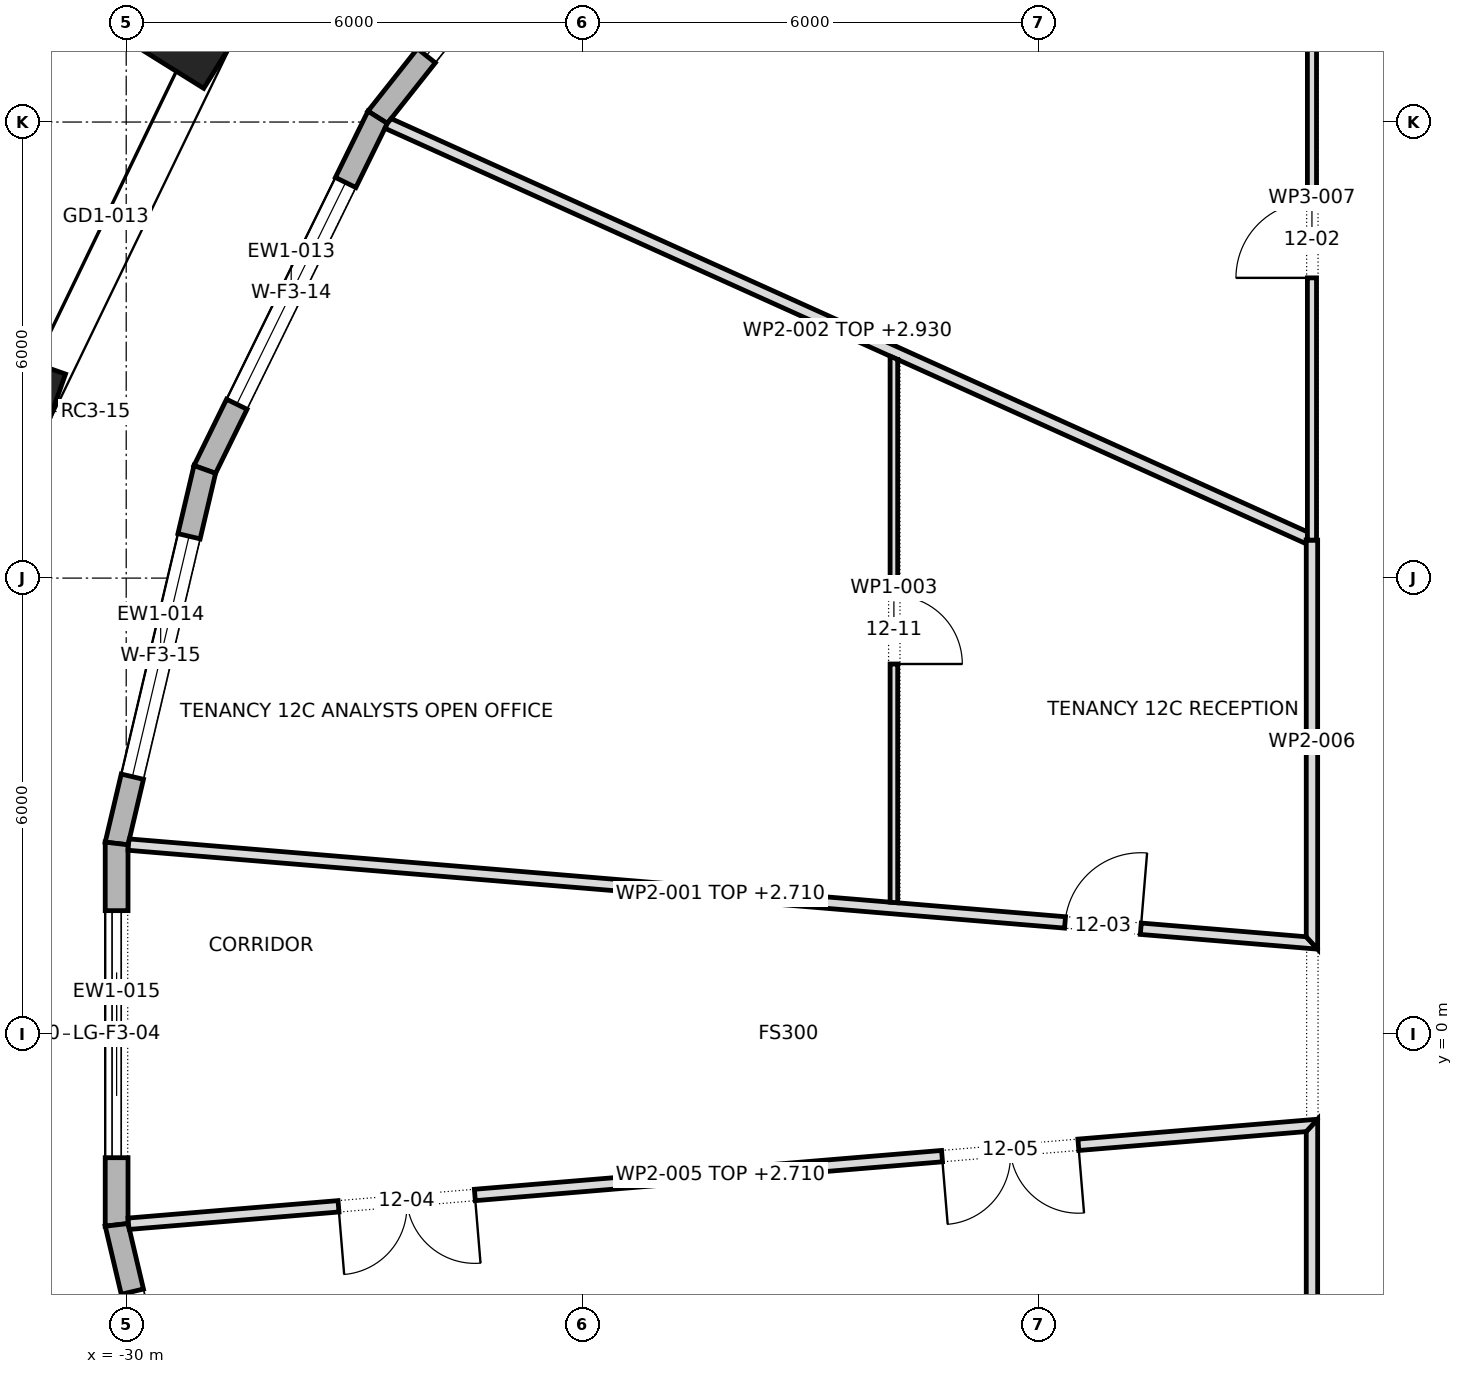
"""IFC4 building model, lengths in metres.
Left out: names, types, materials, properties, quantities, classifications, styles, units other than length and angle.
Written with IfcOpenShell. Run it as: python <this file> out.ifc"""

import sys

from ifc_helpers import new_model, si_unit, direction, frame, frame_2d, origin, origin_2d, place, context, subcontext, project, spatial, polyline, rectangle, outline, extrude, element, fill, save


model = new_model("IFC4")
c1 = context("Model", 3, precision=1e-05, world=origin(), true_north=direction((0.0, 1.0)))
c2 = subcontext(c1, "Body", "Model", "MODEL_VIEW")
j1 = project(units=[si_unit("LENGTHUNIT", "METRE"), si_unit("PLANEANGLEUNIT", "RADIAN")], contexts=[c1])
p1 = place(None, origin())
s1 = spatial("IfcSite", under=j1, at=p1, CompositionType="ELEMENT")
p2 = place(p1, origin())
s2 = spatial("IfcBuilding", under=s1, at=p2, CompositionType="ELEMENT")
p3 = place(p2, frame((0.0, 0.0, 178.9)))
s3 = spatial("IfcBuildingStorey", under=s2, at=p3, CompositionType="ELEMENT", Elevation=178.9)
for number, where, z_axis, x_axis in (
    (1, (-29.034, 13.302, 0.0), (0.0, 0.0, 1.0), (-0.529, -0.849, 0.0)),
    (2, (-31.503, 8.191, 0.0), (0.0, 0.0, 1.0), (-0.334, -0.943, 0.0)),
):
    element("IfcColumn", number, at=place(p3, frame(where, z_axis=z_axis, x_axis=x_axis)), inside=s3, PredefinedType="COLUMN", context=c2, shape_type="SweptSolid", body=[
        extrude(rectangle(XDim=1.4, YDim=1.0, at=origin_2d()), origin(), (0.0, 0.0, 1.0), 4.0),
    ])
p4 = place(p3, frame((-23.392, 16.23, 0.0), z_axis=(0.0, 0.0, 1.0), x_axis=(-0.620766467446, -0.78399553117, 0.0)))
e3 = element("IfcWall", 3, at=p4, inside=s3, PredefinedType="STANDARD", context=c2, shape_type="SweptSolid", body=[
    extrude(outline(polyline([(-0.015, -0.15), (5.332, -0.15), (5.3, 0.15), (0.015, 0.15), (-0.015, -0.15)])), origin(), (0.0, 0.0, 1.0), 3.7),
])
p5 = place(p4, frame((1.033, 0.0, 0.6)))
e4 = element("IfcOpeningElement", 4, at=p5, cuts=e3, PredefinedType="OPENING", context=c2, shape_type="SweptSolid", body=[
    extrude(rectangle(XDim=3.25, YDim=2.65, at=frame_2d((1.625, 1.325))), frame((0.0, 0.162, 0.0), z_axis=(0.0, -1.0, 0.0), x_axis=(1.0, 0.0, 0.0)), (0.0, 0.0, 1.0), 0.324),
])
p6 = place(p3, frame((-26.692, 12.062, 0.0), z_axis=(0.0, 0.0, 1.0), x_axis=(-0.440673883676, -0.897667270343, 0.0)))
e5 = element("IfcWall", 5, at=p6, inside=s3, PredefinedType="STANDARD", context=c2, shape_type="SweptSolid", body=[
    extrude(outline(polyline([(-0.016, -0.15), (5.178, -0.15), (5.144, 0.15), (0.016, 0.15), (-0.016, -0.15)])), origin(), (0.0, 0.0, 1.0), 3.7),
])
p7 = place(p6, frame((0.956, 0.0, 0.6)))
e6 = element("IfcOpeningElement", 6, at=p7, cuts=e5, PredefinedType="OPENING", context=c2, shape_type="SweptSolid", body=[
    extrude(rectangle(XDim=3.25, YDim=2.65, at=frame_2d((1.625, 1.325))), frame((0.0, 0.162, 0.0), z_axis=(0.0, -1.0, 0.0), x_axis=(1.0, 0.0, 0.0)), (0.0, 0.0, 1.0), 0.324),
])
p8 = place(p3, frame((-28.966, 7.429, 0.0), z_axis=(0.0, 0.0, 1.0), x_axis=(-0.229434992017, -0.973323987395, 0.0)))
e7 = element("IfcWall", 7, at=p8, inside=s3, PredefinedType="STANDARD", context=c2, shape_type="SweptSolid", body=[
    extrude(outline(polyline([(-0.017, -0.15), (5.073, -0.15), (5.038, 0.15), (0.017, 0.15), (-0.017, -0.15)])), origin(), (0.0, 0.0, 1.0), 3.7),
])
p9 = place(p8, frame((0.903, 0.0, 0.6)))
e8 = element("IfcOpeningElement", 8, at=p9, cuts=e7, PredefinedType="OPENING", context=c2, shape_type="SweptSolid", body=[
    extrude(rectangle(XDim=3.25, YDim=2.65, at=frame_2d((1.625, 1.325))), frame((0.0, 0.162, 0.0), z_axis=(0.0, -1.0, 0.0), x_axis=(1.0, 0.0, 0.0)), (0.0, 0.0, 1.0), 0.324),
])
p10 = place(p3, frame((-30.126, 2.509, 0.0), z_axis=(0.0, 0.0, 1.0), x_axis=(0.0, -1.0, 0.0)))
e9 = element("IfcWall", 9, at=p10, inside=s3, PredefinedType="STANDARD", context=c2, shape_type="SweptSolid", body=[
    extrude(outline(polyline([(-0.017, -0.15), (5.035, -0.15), (5.0, 0.15), (0.017, 0.15), (-0.017, -0.15)])), origin(), (0.0, 0.0, 1.0), 3.7),
])
p11 = place(p10, frame((0.884, 0.0, 0.0)))
e10 = element("IfcOpeningElement", 10, at=p11, cuts=e9, PredefinedType="OPENING", context=c2, shape_type="SweptSolid", body=[
    extrude(rectangle(XDim=3.25, YDim=3.25, at=frame_2d((1.625, 1.625))), frame((0.0, 0.162, 0.0), z_axis=(0.0, -1.0, 0.0), x_axis=(1.0, 0.0, 0.0)), (0.0, 0.0, 1.0), 0.324),
])
p12 = place(p3, frame((-30.126, -2.509, 0.0), z_axis=(0.0, 0.0, 1.0), x_axis=(0.229434992017, -0.973323987395, 0.0)))
e11 = element("IfcWall", 11, at=p12, inside=s3, PredefinedType="STANDARD", context=c2, shape_type="SweptSolid", body=[
    extrude(outline(polyline([(-0.017, -0.15), (5.072, -0.15), (5.039, 0.15), (0.017, 0.15), (-0.017, -0.15)])), origin(), (0.0, 0.0, 1.0), 3.7),
])
p13 = place(p12, frame((0.903, 0.0, 0.6)))
e12 = element("IfcOpeningElement", 12, at=p13, cuts=e11, PredefinedType="OPENING", context=c2, shape_type="SweptSolid", body=[
    extrude(rectangle(XDim=3.25, YDim=2.65, at=frame_2d((1.625, 1.325))), frame((0.0, 0.162, 0.0), z_axis=(0.0, -1.0, 0.0), x_axis=(1.0, 0.0, 0.0)), (0.0, 0.0, 1.0), 0.324),
])
p14 = place(p3, frame((-29.97, 2.494, 0.0), z_axis=(0.0, 0.0, 1.0), x_axis=(0.996561500002, -0.082856361942, 0.0)))
e13 = element("IfcWall", 13, at=p14, inside=s3, PredefinedType="PARTITIONING", context=c2, shape_type="SweptSolid", body=[
    extrude(outline(polyline([(15.705, -0.075), (15.705, -0.075), (15.624, 0.0), (15.542, 0.075), (13.6, 0.075), (11.658, 0.075), (9.716, 0.075), (7.774, 0.075), (5.832, 0.075), (3.89, 0.075), (1.948, 0.075), (0.006, 0.075), (0.0, 0.036), (0.0, -0.074), (0.0, -0.075), (1.963, -0.075), (3.926, -0.075), (5.889, -0.075), (7.853, -0.075), (9.816, -0.075), (11.779, -0.075), (13.742, -0.075), (15.705, -0.075)])), origin(), (0.0, 0.0, 1.0), 2.71),
])
p15 = place(p14, frame((12.364, 0.0, 0.0)))
e14 = element("IfcOpeningElement", 14, at=p15, cuts=e13, PredefinedType="OPENING", context=c2, shape_type="SweptSolid", body=[
    extrude(rectangle(XDim=1.0, YDim=2.1, at=frame_2d((0.5, 1.05))), frame((0.0, 0.087, 0.0), z_axis=(0.0, -1.0, 0.0), x_axis=(1.0, 0.0, 0.0)), (0.0, 0.0, 1.0), 0.174),
])
p16 = place(p3, frame((-26.565, 11.986, 0.0), z_axis=(0.0, 0.0, 1.0), x_axis=(0.911575557789, -0.411132584991, 0.0)))
e15 = element("IfcWall", 15, at=p16, inside=s3, PredefinedType="PARTITIONING", context=c2, shape_type="SweptSolid", body=[
    extrude(outline(polyline([(0.0, -0.075), (1.849, -0.075), (3.698, -0.075), (5.546, -0.075), (7.395, -0.075), (7.399, -0.073), (7.4, -0.075), (9.365, -0.075), (11.331, -0.075), (13.296, -0.075), (13.296, -0.075), (13.276, -0.031), (13.29, -0.024), (13.245, 0.075), (11.356, 0.075), (9.467, 0.075), (7.578, 0.075), (5.689, 0.075), (3.8, 0.075), (1.911, 0.075), (0.022, 0.075), (0.002, -0.003), (0.0, -0.07), (0.0, -0.075)])), origin(), (0.0, 0.0, 1.0), 2.93),
])
p17 = place(p3, frame((-19.9, 1.729, 0.0), z_axis=(0.0, 0.0, 1.0), x_axis=(0.0, 1.0, 0.0)))
e16 = element("IfcWall", 16, at=p17, inside=s3, PredefinedType="PARTITIONING", context=c2, shape_type="SweptSolid", body=[
    extrude(outline(polyline([(0.0, -0.05), (1.787, -0.05), (3.573, -0.05), (5.36, -0.05), (7.146, -0.05), (7.191, 0.049), (7.191, 0.05), (5.396, 0.05), (3.6, 0.05), (1.804, 0.05), (0.008, 0.05), (0.0, -0.048), (0.0, -0.05)])), origin(), (0.0, 0.0, 1.0), 3.7),
])
p18 = place(p17, frame((3.142, 0.0, 0.0)))
e17 = element("IfcOpeningElement", 17, at=p18, cuts=e16, PredefinedType="OPENING", context=c2, shape_type="SweptSolid", body=[
    extrude(rectangle(XDim=0.9, YDim=2.1, at=frame_2d((0.45, 1.05))), frame((0.0, 0.062, 0.0), z_axis=(0.0, -1.0, 0.0), x_axis=(1.0, 0.0, 0.0)), (0.0, 0.0, 1.0), 0.124),
])
p19 = place(p3, frame((-14.4, -14.475, 0.0), z_axis=(0.0, 0.0, 1.0), x_axis=(0.0, 1.0, 0.0)))
e18 = element("IfcWall", 18, at=p19, inside=s3, PredefinedType="PARTITIONING", context=c2, shape_type="SweptSolid", body=[
    extrude(outline(polyline([(0.15, -0.075), (2.037, -0.075), (3.923, -0.075), (5.81, -0.075), (7.697, -0.075), (9.583, -0.075), (11.47, -0.075), (13.357, -0.075), (13.194, 0.075), (11.309, 0.075), (9.424, 0.075), (7.539, 0.075), (5.655, 0.075), (3.77, 0.075), (1.885, 0.075), (0.0, 0.075), (0.15, -0.075)])), origin(), (0.0, 0.0, 1.0), 3.7),
])
p20 = place(p3, frame((-14.319, -1.193, 0.0), z_axis=(0.0, 0.0, 1.0), x_axis=(-0.996562676797, -0.08284220673, 0.0)))
e19 = element("IfcWall", 19, at=p20, inside=s3, PredefinedType="PARTITIONING", context=c2, shape_type="SweptSolid", body=[
    extrude(outline(polyline([(15.705, -0.075), (15.705, 0.038), (15.699, 0.075), (13.757, 0.075), (11.815, 0.075), (9.873, 0.075), (7.931, 0.075), (5.989, 0.075), (4.047, 0.075), (2.105, 0.075), (0.163, 0.075), (0.082, 0.0), (0.0, -0.075), (0.0, -0.075), (1.963, -0.075), (3.926, -0.075), (5.889, -0.075), (7.853, -0.075), (9.815, -0.075), (11.779, -0.075), (13.742, -0.075), (15.705, -0.075)])), origin(), (0.0, 0.0, 1.0), 2.71),
])
p21 = place(p20, frame((11.133, 0.0, 0.0)))
e20 = element("IfcOpeningElement", 20, at=p21, cuts=e19, PredefinedType="OPENING", context=c2, shape_type="SweptSolid", body=[
    extrude(rectangle(XDim=1.8, YDim=2.1, at=frame_2d((0.9, 1.05))), frame((0.0, 0.087, 0.0), z_axis=(0.0, -1.0, 0.0), x_axis=(1.0, 0.0, 0.0)), (0.0, 0.0, 1.0), 0.174),
])
p22 = place(p20, frame((3.165, 0.0, 0.0)))
e21 = element("IfcOpeningElement", 21, at=p22, cuts=e19, PredefinedType="OPENING", context=c2, shape_type="SweptSolid", body=[
    extrude(rectangle(XDim=1.8, YDim=2.1, at=frame_2d((0.9, 1.05))), frame((0.0, 0.087, 0.0), z_axis=(0.0, -1.0, 0.0), x_axis=(1.0, 0.0, 0.0)), (0.0, 0.0, 1.0), 0.174),
])
p23 = place(p3, frame((-14.4, 1.118, 0.0), z_axis=(0.0, 0.0, 1.0), x_axis=(0.0, 1.0, 0.0)))
e22 = element("IfcWall", 22, at=p23, inside=s3, PredefinedType="PARTITIONING", context=c2, shape_type="SweptSolid", body=[
    extrude(outline(polyline([(5.382, 0.075), (3.642, 0.075), (1.903, 0.075), (0.163, 0.075), (0.0, -0.075), (1.794, -0.075), (3.588, -0.075), (5.382, -0.075), (5.382, 0.075)])), origin(), (0.0, 0.0, 1.0), 3.7),
])
p24 = place(p3, frame((-14.4, 6.5, 0.0), z_axis=(0.0, 0.0, 1.0), x_axis=(0.0, 1.0, 0.0)))
e23 = element("IfcWall", 23, at=p24, inside=s3, PredefinedType="PARTITIONING", context=c2, shape_type="SweptSolid", body=[
    extrude(outline(polyline([(0.0, -0.06), (1.96, -0.06), (3.92, -0.06), (5.88, -0.06), (7.84, -0.06), (7.96, 0.06), (5.97, 0.06), (3.98, 0.06), (1.99, 0.06), (0.0, 0.06), (0.0, -0.06)])), origin(), (0.0, 0.0, 1.0), 3.7),
])
p25 = place(p24, frame((3.45, 0.0, 0.0)))
e24 = element("IfcOpeningElement", 24, at=p25, cuts=e23, PredefinedType="OPENING", context=c2, shape_type="SweptSolid", body=[
    extrude(rectangle(XDim=1.0, YDim=2.1, at=frame_2d((0.5, 1.05))), frame((0.0, 0.072, 0.0), z_axis=(0.0, -1.0, 0.0), x_axis=(1.0, 0.0, 0.0)), (0.0, 0.0, 1.0), 0.144),
])
p26 = place(p5, origin())
e25 = element("IfcWindow", 25, at=p26, inside=s3, PartitioningType="TRIPLE_PANEL_VERTICAL", PredefinedType="WINDOW", context=c2, shape_type="SweptSolid", body=[
    extrude(rectangle(XDim=3.25, YDim=2.65, at=frame_2d((1.625, 1.325))), frame((0.0, 0.03, 0.0), z_axis=(0.0, -1.0, 0.0), x_axis=(1.0, 0.0, 0.0)), (0.0, 0.0, 1.0), 0.06),
])
fill(e4, e25)
p27 = place(p7, origin())
e26 = element("IfcWindow", 26, at=p27, inside=s3, PartitioningType="TRIPLE_PANEL_VERTICAL", PredefinedType="WINDOW", context=c2, shape_type="SweptSolid", body=[
    extrude(rectangle(XDim=3.25, YDim=2.65, at=frame_2d((1.625, 1.325))), frame((0.0, 0.03, 0.0), z_axis=(0.0, -1.0, 0.0), x_axis=(1.0, 0.0, 0.0)), (0.0, 0.0, 1.0), 0.06),
])
fill(e6, e26)
p28 = place(p9, origin())
e27 = element("IfcWindow", 27, at=p28, inside=s3, PartitioningType="TRIPLE_PANEL_VERTICAL", PredefinedType="WINDOW", context=c2, shape_type="SweptSolid", body=[
    extrude(rectangle(XDim=3.25, YDim=2.65, at=frame_2d((1.625, 1.325))), frame((0.0, 0.03, 0.0), z_axis=(0.0, -1.0, 0.0), x_axis=(1.0, 0.0, 0.0)), (0.0, 0.0, 1.0), 0.06),
])
fill(e8, e27)
p29 = place(p11, origin())
e28 = element("IfcDoor", 28, at=p29, inside=s3, OperationType="DOUBLE_DOOR_SLIDING", PredefinedType="DOOR", context=c2, shape_type="SweptSolid", body=[
    extrude(rectangle(XDim=3.25, YDim=3.25, at=frame_2d((1.625, 1.625))), frame((0.0, 0.025, 0.0), z_axis=(0.0, -1.0, 0.0), x_axis=(1.0, 0.0, 0.0)), (0.0, 0.0, 1.0), 0.05),
])
fill(e10, e28)
p30 = place(p13, origin())
e29 = element("IfcWindow", 29, at=p30, inside=s3, PartitioningType="TRIPLE_PANEL_VERTICAL", PredefinedType="WINDOW", context=c2, shape_type="SweptSolid", body=[
    extrude(rectangle(XDim=3.25, YDim=2.65, at=frame_2d((1.625, 1.325))), frame((0.0, 0.03, 0.0), z_axis=(0.0, -1.0, 0.0), x_axis=(1.0, 0.0, 0.0)), (0.0, 0.0, 1.0), 0.06),
])
fill(e12, e29)
p31 = place(p25, origin())
e30 = element("IfcDoor", 30, at=p31, inside=s3, OperationType="SINGLE_SWING_RIGHT", PredefinedType="DOOR", context=c2, shape_type="SweptSolid", body=[
    extrude(rectangle(XDim=1.0, YDim=2.1, at=frame_2d((0.5, 1.05))), frame((0.0, 0.025, 0.0), z_axis=(0.0, -1.0, 0.0), x_axis=(1.0, 0.0, 0.0)), (0.0, 0.0, 1.0), 0.05),
])
fill(e24, e30)
p32 = place(p15, origin())
e31 = element("IfcDoor", 31, at=p32, inside=s3, OperationType="SINGLE_SWING_LEFT", PredefinedType="DOOR", context=c2, shape_type="SweptSolid", body=[
    extrude(rectangle(XDim=1.0, YDim=2.1, at=frame_2d((0.5, 1.05))), frame((0.0, 0.025, 0.0), z_axis=(0.0, -1.0, 0.0), x_axis=(1.0, 0.0, 0.0)), (0.0, 0.0, 1.0), 0.05),
])
fill(e14, e31)
p33 = place(p21, origin())
e32 = element("IfcDoor", 32, at=p33, inside=s3, OperationType="DOUBLE_DOOR_SINGLE_SWING", PredefinedType="DOOR", context=c2, shape_type="SweptSolid", body=[
    extrude(rectangle(XDim=1.8, YDim=2.1, at=frame_2d((0.9, 1.05))), frame((0.0, 0.025, 0.0), z_axis=(0.0, -1.0, 0.0), x_axis=(1.0, 0.0, 0.0)), (0.0, 0.0, 1.0), 0.05),
])
fill(e20, e32)
p34 = place(p22, origin())
e33 = element("IfcDoor", 33, at=p34, inside=s3, OperationType="DOUBLE_DOOR_SINGLE_SWING", PredefinedType="DOOR", context=c2, shape_type="SweptSolid", body=[
    extrude(rectangle(XDim=1.8, YDim=2.1, at=frame_2d((0.9, 1.05))), frame((0.0, 0.025, 0.0), z_axis=(0.0, -1.0, 0.0), x_axis=(1.0, 0.0, 0.0)), (0.0, 0.0, 1.0), 0.05),
])
fill(e21, e33)
p35 = place(p18, frame((0.9, 0.0, 0.0), z_axis=(0.0, 0.0, 1.0), x_axis=(-1.0, 0.0, 0.0)))
e34 = element("IfcDoor", 34, at=p35, inside=s3, OperationType="SINGLE_SWING_LEFT", PredefinedType="DOOR", context=c2, shape_type="SweptSolid", body=[
    extrude(rectangle(XDim=0.9, YDim=2.1, at=frame_2d((0.45, 1.05))), frame((0.0, 0.025, 0.0), z_axis=(0.0, -1.0, 0.0), x_axis=(1.0, 0.0, 0.0)), (0.0, 0.0, 1.0), 0.05),
])
fill(e17, e34)
save(model, sys.argv[1])
